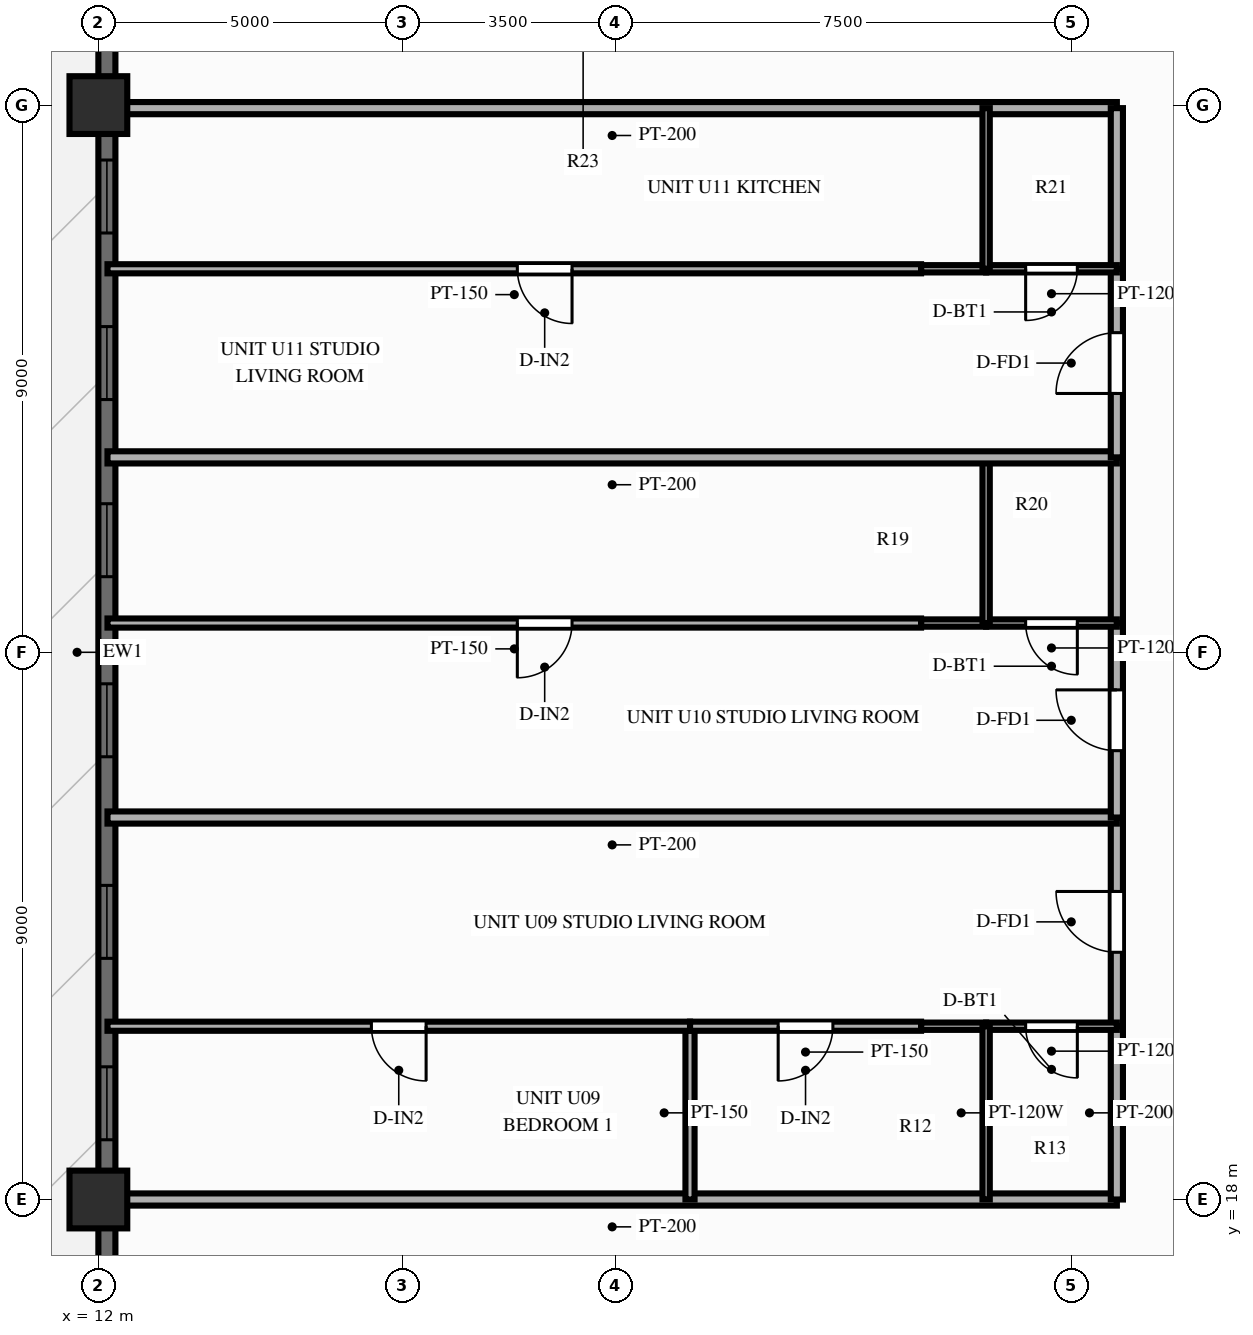
"""IFC4 building model, lengths in metres.
Left out: names, types, materials, properties, quantities, classifications, styles, units other than length and angle.
Written with IfcOpenShell. Run it as: python <this file> out.ifc"""

import sys

from ifc_helpers import new_model, si_unit, direction, frame, frame_2d, origin, origin_2d, place, context, subcontext, project, spatial, rectangle, extrude, source, transform, mapped, element, fill, save


model = new_model("IFC4")
c1 = context("Model", 3, precision=1e-05, world=origin(), true_north=direction((0.0, 1.0)))
c2 = subcontext(c1, "Body", "Model", "MODEL_VIEW")
j1 = project(units=[si_unit("LENGTHUNIT", "METRE"), si_unit("PLANEANGLEUNIT", "RADIAN")], contexts=[c1])
p1 = place(None, origin())
s1 = spatial("IfcSite", under=j1, at=p1, CompositionType="ELEMENT")
p2 = place(p1, origin())
s2 = spatial("IfcBuilding", under=s1, at=p2, CompositionType="ELEMENT")
p3 = place(p2, frame((0.0, 0.0, 86.85)))
s3 = spatial("IfcBuildingStorey", under=s2, at=p3, CompositionType="ELEMENT", Elevation=86.85)
m1 = source(origin(), c2, "Body", "SweptSolid", [
    extrude(rectangle(XDim=0.95, YDim=0.95, at=origin_2d()), origin(), (0.0, 0.0, 1.0), 3.0),
])
for number, where, z_axis, x_axis in (
    (1, (12.0, 36.0, 0.0), (0.0, 0.0, 1.0), (1.0, 0.0, 0.0)),
    (2, (12.0, 18.0, 0.0), (0.0, 0.0, 1.0), (1.0, 0.0, 0.0)),
):
    element("IfcColumn", number, at=place(p3, frame(where, z_axis=z_axis, x_axis=x_axis)), inside=s3, PredefinedType="COLUMN", context=c2, shape_type="MappedRepresentation", body=[
        mapped(m1, transform((0.0, 0.0, 0.0), scale=1.0)),
    ])
p4 = place(p3, frame((12.14, 7.2, 0.0), z_axis=(0.0, 0.0, 1.0), x_axis=(0.0, 1.0, 0.0)))
e3 = element("IfcWall", 3, at=p4, inside=s3, PredefinedType="SOLIDWALL", context=c2, shape_type="SweptSolid", body=[
    extrude(rectangle(XDim=39.6, YDim=0.28, at=frame_2d((19.8, 0.0))), origin(), (0.0, 0.0, 1.0), 2.28),
])
p5 = place(p4, frame((4.6, 0.0, 0.0)))
e4 = element("IfcOpeningElement", 4, at=p5, cuts=e3, PredefinedType="OPENING", context=c2, shape_type="SweptSolid", body=[
    extrude(rectangle(XDim=1.6, YDim=2.15, at=frame_2d((0.8, 1.075))), frame((0.0, 0.152, 0.0), z_axis=(0.0, -1.0, 0.0), x_axis=(1.0, 0.0, 0.0)), (0.0, 0.0, 1.0), 0.304),
])
p6 = place(p4, frame((11.782, 0.0, 0.25)))
e5 = element("IfcOpeningElement", 5, at=p6, cuts=e3, PredefinedType="OPENING", context=c2, shape_type="SweptSolid", body=[
    extrude(rectangle(XDim=1.2, YDim=1.5, at=frame_2d((0.6, 0.75))), frame((0.0, 0.152, 0.0), z_axis=(0.0, -1.0, 0.0), x_axis=(1.0, 0.0, 0.0)), (0.0, 0.0, 1.0), 0.304),
])
p7 = place(p4, frame((14.766, 0.0, 0.25)))
e6 = element("IfcOpeningElement", 6, at=p7, cuts=e3, PredefinedType="OPENING", context=c2, shape_type="SweptSolid", body=[
    extrude(rectangle(XDim=1.2, YDim=1.5, at=frame_2d((0.6, 0.75))), frame((0.0, 0.152, 0.0), z_axis=(0.0, -1.0, 0.0), x_axis=(1.0, 0.0, 0.0)), (0.0, 0.0, 1.0), 0.304),
])
p8 = place(p4, frame((18.082, 0.0, 0.25)))
e7 = element("IfcOpeningElement", 7, at=p8, cuts=e3, PredefinedType="OPENING", context=c2, shape_type="SweptSolid", body=[
    extrude(rectangle(XDim=1.2, YDim=1.5, at=frame_2d((0.6, 0.75))), frame((0.0, 0.152, 0.0), z_axis=(0.0, -1.0, 0.0), x_axis=(1.0, 0.0, 0.0)), (0.0, 0.0, 1.0), 0.304),
])
p9 = place(p4, frame((21.044, 0.0, 0.25)))
e8 = element("IfcOpeningElement", 8, at=p9, cuts=e3, PredefinedType="OPENING", context=c2, shape_type="SweptSolid", body=[
    extrude(rectangle(XDim=1.2, YDim=1.5, at=frame_2d((0.6, 0.75))), frame((0.0, 0.152, 0.0), z_axis=(0.0, -1.0, 0.0), x_axis=(1.0, 0.0, 0.0)), (0.0, 0.0, 1.0), 0.304),
])
p10 = place(p4, frame((23.957, 0.0, 0.25)))
e9 = element("IfcOpeningElement", 9, at=p10, cuts=e3, PredefinedType="OPENING", context=c2, shape_type="SweptSolid", body=[
    extrude(rectangle(XDim=1.2, YDim=1.5, at=frame_2d((0.6, 0.75))), frame((0.0, 0.152, 0.0), z_axis=(0.0, -1.0, 0.0), x_axis=(1.0, 0.0, 0.0)), (0.0, 0.0, 1.0), 0.304),
])
p11 = place(p4, frame((26.696, 0.0, 0.25)))
e10 = element("IfcOpeningElement", 10, at=p11, cuts=e3, PredefinedType="OPENING", context=c2, shape_type="SweptSolid", body=[
    extrude(rectangle(XDim=1.2, YDim=1.5, at=frame_2d((0.6, 0.75))), frame((0.0, 0.152, 0.0), z_axis=(0.0, -1.0, 0.0), x_axis=(1.0, 0.0, 0.0)), (0.0, 0.0, 1.0), 0.304),
])
p12 = place(p4, frame((33.6, 0.0, 0.25)))
e11 = element("IfcOpeningElement", 11, at=p12, cuts=e3, PredefinedType="OPENING", context=c2, shape_type="SweptSolid", body=[
    extrude(rectangle(XDim=1.2, YDim=1.5, at=frame_2d((0.6, 0.75))), frame((0.0, 0.152, 0.0), z_axis=(0.0, -1.0, 0.0), x_axis=(1.0, 0.0, 0.0)), (0.0, 0.0, 1.0), 0.304),
])
for number, where, z_axis, x_axis in (
    (12, (28.75, 18.0, 0.0), (0.0, 0.0, 1.0), (-1.0, 0.0, 0.0)),
    (13, (28.75, 35.95, 0.0), (0.0, 0.0, 1.0), (-1.0, 0.0, 0.0)),
):
    element("IfcWall", number, at=place(p3, frame(where, z_axis=z_axis, x_axis=x_axis)), inside=s3, PredefinedType="PARTITIONING", context=c2, shape_type="SweptSolid", body=[
        extrude(rectangle(XDim=16.6, YDim=0.2, at=frame_2d((8.3, 0.0))), origin(), (0.0, 0.0, 1.0), 2.34),
    ])
p13 = place(p3, frame((28.75, 18.0, 0.0), z_axis=(0.0, 0.0, 1.0), x_axis=(0.0, 1.0, 0.0)))
e14 = element("IfcWall", 14, at=p13, inside=s3, PredefinedType="PARTITIONING", context=c2, shape_type="SweptSolid", body=[
    extrude(rectangle(XDim=2.85, YDim=0.2, at=frame_2d((1.425, 0.0))), origin(), (0.0, 0.0, 1.0), 2.79),
])
p14 = place(p3, frame((28.75, 20.85, 0.0), z_axis=(0.0, 0.0, 1.0), x_axis=(0.0, 1.0, 0.0)))
e15 = element("IfcWall", 15, at=p14, inside=s3, PredefinedType="PARTITIONING", context=c2, shape_type="SweptSolid", body=[
    extrude(rectangle(XDim=3.432, YDim=0.2, at=frame_2d((1.716, 0.0))), origin(), (0.0, 0.0, 1.0), 2.79),
])
p15 = place(p14, frame((1.216, 0.0, 0.0)))
e16 = element("IfcOpeningElement", 16, at=p15, cuts=e15, PredefinedType="OPENING", context=c2, shape_type="SweptSolid", body=[
    extrude(rectangle(XDim=1.0, YDim=2.15, at=frame_2d((0.5, 1.075))), frame((0.0, 0.112, 0.0), z_axis=(0.0, -1.0, 0.0), x_axis=(1.0, 0.0, 0.0)), (0.0, 0.0, 1.0), 0.224),
])
p16 = place(p3, frame((28.75, 20.85, 0.0), z_axis=(0.0, 0.0, 1.0), x_axis=(-1.0, 0.0, 0.0)))
e17 = element("IfcWall", 17, at=p16, inside=s3, PredefinedType="PARTITIONING", context=c2, shape_type="SweptSolid", body=[
    extrude(rectangle(XDim=2.15, YDim=0.12, at=frame_2d((1.075, 0.0))), origin(), (0.0, 0.0, 1.0), 2.79),
])
p17 = place(p16, frame((0.65, 0.0, 0.0)))
e18 = element("IfcOpeningElement", 18, at=p17, cuts=e17, PredefinedType="OPENING", context=c2, shape_type="SweptSolid", body=[
    extrude(rectangle(XDim=0.85, YDim=2.05, at=frame_2d((0.425, 1.025))), frame((0.0, 0.072, 0.0), z_axis=(0.0, -1.0, 0.0), x_axis=(1.0, 0.0, 0.0)), (0.0, 0.0, 1.0), 0.144),
])
p18 = place(p3, frame((26.6, 20.85, 0.0), z_axis=(0.0, 0.0, 1.0), x_axis=(-1.0, 0.0, 0.0)))
e19 = element("IfcWall", 19, at=p18, inside=s3, PredefinedType="PARTITIONING", context=c2, shape_type="SweptSolid", body=[
    extrude(rectangle(XDim=1.07, YDim=0.12, at=frame_2d((0.535, 0.0))), origin(), (0.0, 0.0, 1.0), 2.79),
])
p19 = place(p3, frame((26.6, 18.0, 0.0), z_axis=(0.0, 0.0, 1.0), x_axis=(0.0, 1.0, 0.0)))
e20 = element("IfcWall", 20, at=p19, inside=s3, PredefinedType="PARTITIONING", context=c2, shape_type="SweptSolid", body=[
    extrude(rectangle(XDim=2.85, YDim=0.12, at=frame_2d((1.425, 0.0))), origin(), (0.0, 0.0, 1.0), 2.79),
])
p20 = place(p3, frame((21.73, 18.0, 0.0), z_axis=(0.0, 0.0, 1.0), x_axis=(0.0, 1.0, 0.0)))
e21 = element("IfcWall", 21, at=p20, inside=s3, PredefinedType="PARTITIONING", context=c2, shape_type="SweptSolid", body=[
    extrude(rectangle(XDim=2.85, YDim=0.15, at=frame_2d((1.425, 0.0))), origin(), (0.0, 0.0, 1.0), 2.49),
])
p21 = place(p3, frame((25.53, 20.85, 0.0), z_axis=(0.0, 0.0, 1.0), x_axis=(-1.0, 0.0, 0.0)))
e22 = element("IfcWall", 22, at=p21, inside=s3, PredefinedType="PARTITIONING", context=c2, shape_type="SweptSolid", body=[
    extrude(rectangle(XDim=3.8, YDim=0.15, at=frame_2d((1.9, 0.0))), origin(), (0.0, 0.0, 1.0), 2.79),
])
p22 = place(p21, frame((1.45, 0.0, 0.0)))
e23 = element("IfcOpeningElement", 23, at=p22, cuts=e22, PredefinedType="OPENING", context=c2, shape_type="SweptSolid", body=[
    extrude(rectangle(XDim=0.9, YDim=2.1, at=frame_2d((0.45, 1.05))), frame((0.0, 0.087, 0.0), z_axis=(0.0, -1.0, 0.0), x_axis=(1.0, 0.0, 0.0)), (0.0, 0.0, 1.0), 0.174),
])
p23 = place(p3, frame((21.73, 20.85, 0.0), z_axis=(0.0, 0.0, 1.0), x_axis=(-1.0, 0.0, 0.0)))
e24 = element("IfcWall", 24, at=p23, inside=s3, PredefinedType="PARTITIONING", context=c2, shape_type="SweptSolid", body=[
    extrude(rectangle(XDim=9.58, YDim=0.15, at=frame_2d((4.79, 0.0))), origin(), (0.0, 0.0, 1.0), 2.79),
])
p24 = place(p23, frame((4.34, 0.0, 0.0)))
e25 = element("IfcOpeningElement", 25, at=p24, cuts=e24, PredefinedType="OPENING", context=c2, shape_type="SweptSolid", body=[
    extrude(rectangle(XDim=0.9, YDim=2.1, at=frame_2d((0.45, 1.05))), frame((0.0, 0.087, 0.0), z_axis=(0.0, -1.0, 0.0), x_axis=(1.0, 0.0, 0.0)), (0.0, 0.0, 1.0), 0.174),
])
p25 = place(p3, frame((28.75, 24.282, 0.0), z_axis=(0.0, 0.0, 1.0), x_axis=(-1.0, 0.0, 0.0)))
e26 = element("IfcWall", 26, at=p25, inside=s3, PredefinedType="PARTITIONING", context=c2, shape_type="SweptSolid", body=[
    extrude(rectangle(XDim=16.6, YDim=0.2, at=frame_2d((8.3, 0.0))), origin(), (0.0, 0.0, 1.0), 2.79),
])
p26 = place(p3, frame((28.75, 24.282, 0.0), z_axis=(0.0, 0.0, 1.0), x_axis=(0.0, 1.0, 0.0)))
e27 = element("IfcWall", 27, at=p26, inside=s3, PredefinedType="PARTITIONING", context=c2, shape_type="SweptSolid", body=[
    extrude(rectangle(XDim=3.199, YDim=0.2, at=frame_2d((1.599, 0.0))), origin(), (0.0, 0.0, 1.0), 2.79),
])
p27 = place(p26, frame((1.099, 0.0, 0.0)))
e28 = element("IfcOpeningElement", 28, at=p27, cuts=e27, PredefinedType="OPENING", context=c2, shape_type="SweptSolid", body=[
    extrude(rectangle(XDim=1.0, YDim=2.15, at=frame_2d((0.5, 1.075))), frame((0.0, 0.112, 0.0), z_axis=(0.0, -1.0, 0.0), x_axis=(1.0, 0.0, 0.0)), (0.0, 0.0, 1.0), 0.224),
])
p28 = place(p3, frame((28.75, 27.481, 0.0), z_axis=(0.0, 0.0, 1.0), x_axis=(0.0, 1.0, 0.0)))
e29 = element("IfcWall", 29, at=p28, inside=s3, PredefinedType="PARTITIONING", context=c2, shape_type="SweptSolid", body=[
    extrude(rectangle(XDim=2.725, YDim=0.2, at=frame_2d((1.362, 0.0))), origin(), (0.0, 0.0, 1.0), 2.79),
])
p29 = place(p3, frame((28.75, 27.481, 0.0), z_axis=(0.0, 0.0, 1.0), x_axis=(-1.0, 0.0, 0.0)))
e30 = element("IfcWall", 30, at=p29, inside=s3, PredefinedType="PARTITIONING", context=c2, shape_type="SweptSolid", body=[
    extrude(rectangle(XDim=2.15, YDim=0.12, at=frame_2d((1.075, 0.0))), origin(), (0.0, 0.0, 1.0), 2.79),
])
p30 = place(p29, frame((0.65, 0.0, 0.0)))
e31 = element("IfcOpeningElement", 31, at=p30, cuts=e30, PredefinedType="OPENING", context=c2, shape_type="SweptSolid", body=[
    extrude(rectangle(XDim=0.85, YDim=2.05, at=frame_2d((0.425, 1.025))), frame((0.0, 0.072, 0.0), z_axis=(0.0, -1.0, 0.0), x_axis=(1.0, 0.0, 0.0)), (0.0, 0.0, 1.0), 0.144),
])
p31 = place(p3, frame((26.6, 27.481, 0.0), z_axis=(0.0, 0.0, 1.0), x_axis=(-1.0, 0.0, 0.0)))
e32 = element("IfcWall", 32, at=p31, inside=s3, PredefinedType="PARTITIONING", context=c2, shape_type="SweptSolid", body=[
    extrude(rectangle(XDim=1.07, YDim=0.12, at=frame_2d((0.535, 0.0))), origin(), (0.0, 0.0, 1.0), 2.79),
])
p32 = place(p3, frame((26.6, 27.481, 0.0), z_axis=(0.0, 0.0, 1.0), x_axis=(0.0, 1.0, 0.0)))
e33 = element("IfcWall", 33, at=p32, inside=s3, PredefinedType="PARTITIONING", context=c2, shape_type="SweptSolid", body=[
    extrude(rectangle(XDim=2.725, YDim=0.12, at=frame_2d((1.362, 0.0))), origin(), (0.0, 0.0, 1.0), 2.79),
])
p33 = place(p3, frame((25.53, 27.481, 0.0), z_axis=(0.0, 0.0, 1.0), x_axis=(-1.0, 0.0, 0.0)))
e34 = element("IfcWall", 34, at=p33, inside=s3, PredefinedType="PARTITIONING", context=c2, shape_type="SweptSolid", body=[
    extrude(rectangle(XDim=13.38, YDim=0.15, at=frame_2d((6.69, 0.0))), origin(), (0.0, 0.0, 1.0), 2.79),
])
p34 = place(p33, frame((5.74, 0.0, 0.0)))
e35 = element("IfcOpeningElement", 35, at=p34, cuts=e34, PredefinedType="OPENING", context=c2, shape_type="SweptSolid", body=[
    extrude(rectangle(XDim=0.9, YDim=2.1, at=frame_2d((0.45, 1.05))), frame((0.0, 0.087, 0.0), z_axis=(0.0, -1.0, 0.0), x_axis=(1.0, 0.0, 0.0)), (0.0, 0.0, 1.0), 0.174),
])
p35 = place(p3, frame((28.75, 30.206, 0.0), z_axis=(0.0, 0.0, 1.0), x_axis=(-1.0, 0.0, 0.0)))
e36 = element("IfcWall", 36, at=p35, inside=s3, PredefinedType="PARTITIONING", context=c2, shape_type="SweptSolid", body=[
    extrude(rectangle(XDim=16.6, YDim=0.2, at=frame_2d((8.3, 0.0))), origin(), (0.0, 0.0, 1.0), 2.79),
])
p36 = place(p3, frame((28.75, 30.206, 0.0), z_axis=(0.0, 0.0, 1.0), x_axis=(0.0, 1.0, 0.0)))
e37 = element("IfcWall", 37, at=p36, inside=s3, PredefinedType="PARTITIONING", context=c2, shape_type="SweptSolid", body=[
    extrude(rectangle(XDim=3.102, YDim=0.2, at=frame_2d((1.551, 0.0))), origin(), (0.0, 0.0, 1.0), 2.79),
])
p37 = place(p36, frame((1.051, 0.0, 0.0)))
e38 = element("IfcOpeningElement", 38, at=p37, cuts=e37, PredefinedType="OPENING", context=c2, shape_type="SweptSolid", body=[
    extrude(rectangle(XDim=1.0, YDim=2.15, at=frame_2d((0.5, 1.075))), frame((0.0, 0.112, 0.0), z_axis=(0.0, -1.0, 0.0), x_axis=(1.0, 0.0, 0.0)), (0.0, 0.0, 1.0), 0.224),
])
p38 = place(p3, frame((28.75, 33.308, 0.0), z_axis=(0.0, 0.0, 1.0), x_axis=(0.0, 1.0, 0.0)))
e39 = element("IfcWall", 39, at=p38, inside=s3, PredefinedType="PARTITIONING", context=c2, shape_type="SweptSolid", body=[
    extrude(rectangle(XDim=2.642, YDim=0.2, at=frame_2d((1.321, 0.0))), origin(), (0.0, 0.0, 1.0), 2.79),
])
p39 = place(p3, frame((28.75, 33.308, 0.0), z_axis=(0.0, 0.0, 1.0), x_axis=(-1.0, 0.0, 0.0)))
e40 = element("IfcWall", 40, at=p39, inside=s3, PredefinedType="PARTITIONING", context=c2, shape_type="SweptSolid", body=[
    extrude(rectangle(XDim=2.15, YDim=0.12, at=frame_2d((1.075, 0.0))), origin(), (0.0, 0.0, 1.0), 2.79),
])
p40 = place(p39, frame((0.65, 0.0, 0.0)))
e41 = element("IfcOpeningElement", 41, at=p40, cuts=e40, PredefinedType="OPENING", context=c2, shape_type="SweptSolid", body=[
    extrude(rectangle(XDim=0.85, YDim=2.05, at=frame_2d((0.425, 1.025))), frame((0.0, 0.072, 0.0), z_axis=(0.0, -1.0, 0.0), x_axis=(1.0, 0.0, 0.0)), (0.0, 0.0, 1.0), 0.144),
])
p41 = place(p3, frame((26.6, 33.308, 0.0), z_axis=(0.0, 0.0, 1.0), x_axis=(-1.0, 0.0, 0.0)))
e42 = element("IfcWall", 42, at=p41, inside=s3, PredefinedType="PARTITIONING", context=c2, shape_type="SweptSolid", body=[
    extrude(rectangle(XDim=1.07, YDim=0.12, at=frame_2d((0.535, 0.0))), origin(), (0.0, 0.0, 1.0), 2.79),
])
p42 = place(p3, frame((26.6, 33.308, 0.0), z_axis=(0.0, 0.0, 1.0), x_axis=(0.0, 1.0, 0.0)))
e43 = element("IfcWall", 43, at=p42, inside=s3, PredefinedType="PARTITIONING", context=c2, shape_type="SweptSolid", body=[
    extrude(rectangle(XDim=2.642, YDim=0.12, at=frame_2d((1.321, 0.0))), origin(), (0.0, 0.0, 1.0), 2.79),
])
p43 = place(p3, frame((25.53, 33.308, 0.0), z_axis=(0.0, 0.0, 1.0), x_axis=(-1.0, 0.0, 0.0)))
e44 = element("IfcWall", 44, at=p43, inside=s3, PredefinedType="PARTITIONING", context=c2, shape_type="SweptSolid", body=[
    extrude(rectangle(XDim=13.38, YDim=0.15, at=frame_2d((6.69, 0.0))), origin(), (0.0, 0.0, 1.0), 2.79),
])
p44 = place(p43, frame((5.74, 0.0, 0.0)))
e45 = element("IfcOpeningElement", 45, at=p44, cuts=e44, PredefinedType="OPENING", context=c2, shape_type="SweptSolid", body=[
    extrude(rectangle(XDim=0.9, YDim=2.1, at=frame_2d((0.45, 1.05))), frame((0.0, 0.087, 0.0), z_axis=(0.0, -1.0, 0.0), x_axis=(1.0, 0.0, 0.0)), (0.0, 0.0, 1.0), 0.174),
])
m2 = source(origin(), c2, "Body", "SweptSolid", [
    extrude(rectangle(XDim=1.2, YDim=1.5, at=frame_2d((0.6, 0.75))), frame((0.0, 0.03, 0.0), z_axis=(0.0, -1.0, 0.0), x_axis=(1.0, 0.0, 0.0)), (0.0, 0.0, 1.0), 0.06),
])
p45 = place(p6, origin())
e46 = element("IfcWindow", 46, at=p45, inside=s3, PartitioningType="SINGLE_PANEL", PredefinedType="WINDOW", context=c2, shape_type="MappedRepresentation", body=[
    mapped(m2, transform((0.0, 0.0, 0.0), scale=1.0)),
])
fill(e5, e46)
p46 = place(p7, origin())
e47 = element("IfcWindow", 47, at=p46, inside=s3, PartitioningType="SINGLE_PANEL", PredefinedType="WINDOW", context=c2, shape_type="MappedRepresentation", body=[
    mapped(m2, transform((0.0, 0.0, 0.0), scale=1.0)),
])
fill(e6, e47)
p47 = place(p8, origin())
e48 = element("IfcWindow", 48, at=p47, inside=s3, PartitioningType="SINGLE_PANEL", PredefinedType="WINDOW", context=c2, shape_type="MappedRepresentation", body=[
    mapped(m2, transform((0.0, 0.0, 0.0), scale=1.0)),
])
fill(e7, e48)
p48 = place(p9, origin())
e49 = element("IfcWindow", 49, at=p48, inside=s3, PartitioningType="SINGLE_PANEL", PredefinedType="WINDOW", context=c2, shape_type="MappedRepresentation", body=[
    mapped(m2, transform((0.0, 0.0, 0.0), scale=1.0)),
])
fill(e8, e49)
p49 = place(p10, origin())
e50 = element("IfcWindow", 50, at=p49, inside=s3, PartitioningType="SINGLE_PANEL", PredefinedType="WINDOW", context=c2, shape_type="MappedRepresentation", body=[
    mapped(m2, transform((0.0, 0.0, 0.0), scale=1.0)),
])
fill(e9, e50)
p50 = place(p11, origin())
e51 = element("IfcWindow", 51, at=p50, inside=s3, PartitioningType="SINGLE_PANEL", PredefinedType="WINDOW", context=c2, shape_type="MappedRepresentation", body=[
    mapped(m2, transform((0.0, 0.0, 0.0), scale=1.0)),
])
fill(e10, e51)
m3 = source(origin(), c2, "Body", "SweptSolid", [
    extrude(rectangle(XDim=1.0, YDim=2.15, at=frame_2d((0.5, 1.075))), frame((0.0, 0.025, 0.0), z_axis=(0.0, -1.0, 0.0), x_axis=(1.0, 0.0, 0.0)), (0.0, 0.0, 1.0), 0.05),
])
p51 = place(p15, origin())
e52 = element("IfcDoor", 52, at=p51, inside=s3, OperationType="SINGLE_SWING_RIGHT", PredefinedType="DOOR", context=c2, shape_type="MappedRepresentation", body=[
    mapped(m3, transform((0.0, 0.0, 0.0), scale=1.0)),
])
fill(e16, e52)
m4 = source(origin(), c2, "Body", "SweptSolid", [
    extrude(rectangle(XDim=0.85, YDim=2.05, at=frame_2d((0.425, 1.025))), frame((0.0, 0.025, 0.0), z_axis=(0.0, -1.0, 0.0), x_axis=(1.0, 0.0, 0.0)), (0.0, 0.0, 1.0), 0.05),
])
p52 = place(p17, origin())
e53 = element("IfcDoor", 53, at=p52, inside=s3, OperationType="SINGLE_SWING_LEFT", PredefinedType="DOOR", context=c2, shape_type="MappedRepresentation", body=[
    mapped(m4, transform((0.0, 0.0, 0.0), scale=1.0)),
])
fill(e18, e53)
m5 = source(origin(), c2, "Body", "SweptSolid", [
    extrude(rectangle(XDim=0.9, YDim=2.1, at=frame_2d((0.45, 1.05))), frame((0.0, 0.025, 0.0), z_axis=(0.0, -1.0, 0.0), x_axis=(1.0, 0.0, 0.0)), (0.0, 0.0, 1.0), 0.05),
])
p53 = place(p22, origin())
e54 = element("IfcDoor", 54, at=p53, inside=s3, OperationType="SINGLE_SWING_RIGHT", PredefinedType="DOOR", context=c2, shape_type="MappedRepresentation", body=[
    mapped(m5, transform((0.0, 0.0, 0.0), scale=1.0)),
])
fill(e23, e54)
p54 = place(p24, origin())
e55 = element("IfcDoor", 55, at=p54, inside=s3, OperationType="SINGLE_SWING_LEFT", PredefinedType="DOOR", context=c2, shape_type="MappedRepresentation", body=[
    mapped(m5, transform((0.0, 0.0, 0.0), scale=1.0)),
])
fill(e25, e55)
p55 = place(p27, origin())
e56 = element("IfcDoor", 56, at=p55, inside=s3, OperationType="SINGLE_SWING_RIGHT", PredefinedType="DOOR", context=c2, shape_type="MappedRepresentation", body=[
    mapped(m3, transform((0.0, 0.0, 0.0), scale=1.0)),
])
fill(e28, e56)
p56 = place(p30, origin())
e57 = element("IfcDoor", 57, at=p56, inside=s3, OperationType="SINGLE_SWING_LEFT", PredefinedType="DOOR", context=c2, shape_type="MappedRepresentation", body=[
    mapped(m4, transform((0.0, 0.0, 0.0), scale=1.0)),
])
fill(e31, e57)
p57 = place(p34, origin())
e58 = element("IfcDoor", 58, at=p57, inside=s3, OperationType="SINGLE_SWING_RIGHT", PredefinedType="DOOR", context=c2, shape_type="MappedRepresentation", body=[
    mapped(m5, transform((0.0, 0.0, 0.0), scale=1.0)),
])
fill(e35, e58)
p58 = place(p37, origin())
e59 = element("IfcDoor", 59, at=p58, inside=s3, OperationType="SINGLE_SWING_LEFT", PredefinedType="DOOR", context=c2, shape_type="MappedRepresentation", body=[
    mapped(m3, transform((0.0, 0.0, 0.0), scale=1.0)),
])
fill(e38, e59)
p59 = place(p40, origin())
e60 = element("IfcDoor", 60, at=p59, inside=s3, OperationType="SINGLE_SWING_RIGHT", PredefinedType="DOOR", context=c2, shape_type="MappedRepresentation", body=[
    mapped(m4, transform((0.0, 0.0, 0.0), scale=1.0)),
])
fill(e41, e60)
p60 = place(p44, origin())
e61 = element("IfcDoor", 61, at=p60, inside=s3, OperationType="SINGLE_SWING_LEFT", PredefinedType="DOOR", context=c2, shape_type="MappedRepresentation", body=[
    mapped(m5, transform((0.0, 0.0, 0.0), scale=1.0)),
])
fill(e45, e61)
save(model, sys.argv[1])
